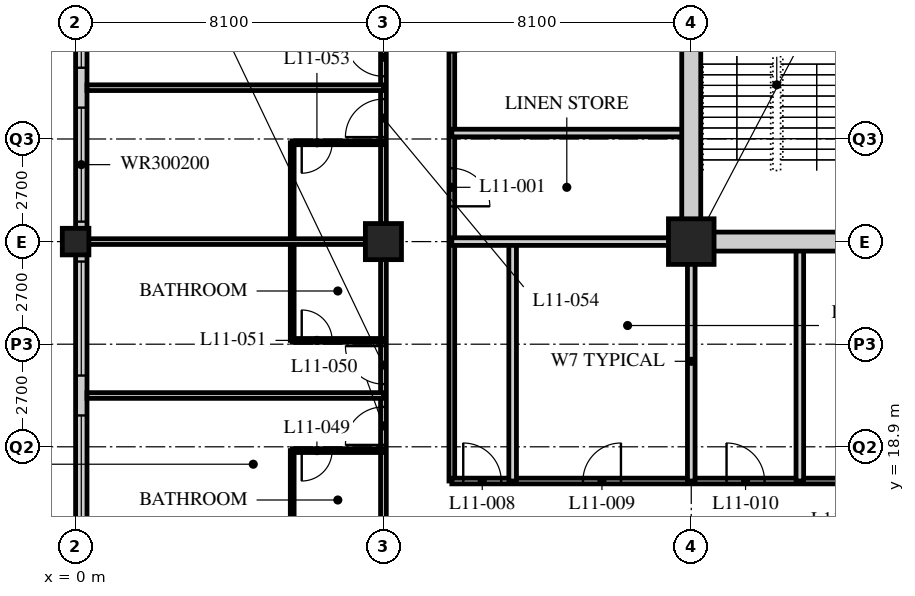
"""IFC4 building model, lengths in metres.
Left out: names, types, materials, properties, quantities, classifications, styles, units other than length and angle.
Written with IfcOpenShell. Run it as: python <this file> out.ifc"""

import sys

from ifc_helpers import new_model, si_unit, direction, frame, frame_2d, origin, origin_2d, place, context, subcontext, project, spatial, rectangle, hollow_rectangle, extrude, element, fill, save


model = new_model("IFC4")
c1 = context("Model", 3, precision=1e-05, world=origin(), true_north=direction((0.0, 1.0)))
c2 = subcontext(c1, "Body", "Model", "MODEL_VIEW")
j1 = project(units=[si_unit("LENGTHUNIT", "METRE"), si_unit("PLANEANGLEUNIT", "RADIAN")], contexts=[c1])
p1 = place(None, origin())
s1 = spatial("IfcSite", under=j1, at=p1, CompositionType="ELEMENT")
p2 = place(p1, origin())
s2 = spatial("IfcBuilding", under=s1, at=p2, CompositionType="ELEMENT")
p3 = place(p2, frame((0.0, 0.0, 50.0)))
s3 = spatial("IfcBuildingStorey", under=s2, at=p3, CompositionType="ELEMENT", Elevation=50.0)
p4 = place(p3, frame((0.0, 24.3, 0.0), z_axis=(0.0, 0.0, 1.0), x_axis=(1.0, 0.0, 0.0)))
e1 = element("IfcColumn", 1, at=p4, inside=s3, PredefinedType="COLUMN", context=c2, shape_type="SweptSolid", body=[
    extrude(hollow_rectangle(XDim=0.7, YDim=0.7, WallThickness=0.06, at=origin_2d()), origin(), (0.0, 0.0, 1.0), 3.4),
])
p5 = place(p3, frame((8.1, 24.3, 0.0), z_axis=(0.0, 0.0, 1.0), x_axis=(1.0, 0.0, 0.0)))
e2 = element("IfcColumn", 2, at=p5, inside=s3, PredefinedType="COLUMN", context=c2, shape_type="SweptSolid", body=[
    extrude(hollow_rectangle(XDim=0.95, YDim=0.95, WallThickness=0.095, at=origin_2d()), origin(), (0.0, 0.0, 1.0), 3.4),
])
p6 = place(p3, frame((16.2, 24.3, 0.0), z_axis=(0.0, 0.0, 1.0), x_axis=(1.0, 0.0, 0.0)))
e3 = element("IfcColumn", 3, at=p6, inside=s3, PredefinedType="COLUMN", context=c2, shape_type="SweptSolid", body=[
    extrude(hollow_rectangle(XDim=1.2, YDim=1.2, WallThickness=0.12, at=origin_2d()), origin(), (0.0, 0.0, 1.0), 3.4),
])
p7 = place(p3, frame((0.15, 40.2, 0.0), z_axis=(0.0, 0.0, 1.0), x_axis=(0.0, -1.0, 0.0)))
e4 = element("IfcWall", 4, at=p7, inside=s3, PredefinedType="SOLIDWALL", context=c2, shape_type="SweptSolid", body=[
    extrude(rectangle(XDim=32.1, YDim=0.3, at=frame_2d((16.05, 0.0))), origin(), (0.0, 0.0, 1.0), 3.19),
])
p8 = place(p7, frame((0.225, 0.0, 0.9)))
e5 = element("IfcOpeningElement", 5, at=p8, cuts=e4, PredefinedType="OPENING", context=c2, shape_type="SweptSolid", body=[
    extrude(rectangle(XDim=3.0, YDim=2.0, at=frame_2d((1.5, 1.0))), frame((0.0, 0.16, 0.0), z_axis=(0.0, -1.0, 0.0), x_axis=(1.0, 0.0, 0.0)), (0.0, 0.0, 1.0), 0.32),
])
p9 = place(p7, frame((4.275, 0.0, 0.9)))
e6 = element("IfcOpeningElement", 6, at=p9, cuts=e4, PredefinedType="OPENING", context=c2, shape_type="SweptSolid", body=[
    extrude(rectangle(XDim=3.0, YDim=2.0, at=frame_2d((1.5, 1.0))), frame((0.0, 0.16, 0.0), z_axis=(0.0, -1.0, 0.0), x_axis=(1.0, 0.0, 0.0)), (0.0, 0.0, 1.0), 0.32),
])
p10 = place(p7, frame((8.325, 0.0, 0.9)))
e7 = element("IfcOpeningElement", 7, at=p10, cuts=e4, PredefinedType="OPENING", context=c2, shape_type="SweptSolid", body=[
    extrude(rectangle(XDim=3.0, YDim=2.0, at=frame_2d((1.5, 1.0))), frame((0.0, 0.16, 0.0), z_axis=(0.0, -1.0, 0.0), x_axis=(1.0, 0.0, 0.0)), (0.0, 0.0, 1.0), 0.32),
])
p11 = place(p7, frame((12.375, 0.0, 0.9)))
e8 = element("IfcOpeningElement", 8, at=p11, cuts=e4, PredefinedType="OPENING", context=c2, shape_type="SweptSolid", body=[
    extrude(rectangle(XDim=3.0, YDim=2.0, at=frame_2d((1.5, 1.0))), frame((0.0, 0.16, 0.0), z_axis=(0.0, -1.0, 0.0), x_axis=(1.0, 0.0, 0.0)), (0.0, 0.0, 1.0), 0.32),
])
p12 = place(p7, frame((16.425, 0.0, 0.9)))
e9 = element("IfcOpeningElement", 9, at=p12, cuts=e4, PredefinedType="OPENING", context=c2, shape_type="SweptSolid", body=[
    extrude(rectangle(XDim=3.0, YDim=2.0, at=frame_2d((1.5, 1.0))), frame((0.0, 0.16, 0.0), z_axis=(0.0, -1.0, 0.0), x_axis=(1.0, 0.0, 0.0)), (0.0, 0.0, 1.0), 0.32),
])
p13 = place(p7, frame((20.475, 0.0, 0.9)))
e10 = element("IfcOpeningElement", 10, at=p13, cuts=e4, PredefinedType="OPENING", context=c2, shape_type="SweptSolid", body=[
    extrude(rectangle(XDim=3.0, YDim=2.0, at=frame_2d((1.5, 1.0))), frame((0.0, 0.16, 0.0), z_axis=(0.0, -1.0, 0.0), x_axis=(1.0, 0.0, 0.0)), (0.0, 0.0, 1.0), 0.32),
])
p14 = place(p7, frame((24.525, 0.0, 0.9)))
e11 = element("IfcOpeningElement", 11, at=p14, cuts=e4, PredefinedType="OPENING", context=c2, shape_type="SweptSolid", body=[
    extrude(rectangle(XDim=3.0, YDim=2.0, at=frame_2d((1.5, 1.0))), frame((0.0, 0.16, 0.0), z_axis=(0.0, -1.0, 0.0), x_axis=(1.0, 0.0, 0.0)), (0.0, 0.0, 1.0), 0.32),
])
p15 = place(p7, frame((28.575, 0.0, 0.9)))
e12 = element("IfcOpeningElement", 12, at=p15, cuts=e4, PredefinedType="OPENING", context=c2, shape_type="SweptSolid", body=[
    extrude(rectangle(XDim=3.0, YDim=2.0, at=frame_2d((1.5, 1.0))), frame((0.0, 0.16, 0.0), z_axis=(0.0, -1.0, 0.0), x_axis=(1.0, 0.0, 0.0)), (0.0, 0.0, 1.0), 0.32),
])
p16 = place(p3, frame((8.1, 16.2, 0.0), z_axis=(0.0, 0.0, 1.0), x_axis=(0.0, 1.0, 0.0)))
e13 = element("IfcWall", 13, at=p16, inside=s3, PredefinedType="PARTITIONING", context=c2, shape_type="SweptSolid", body=[
    extrude(rectangle(XDim=26.1, YDim=0.15, at=frame_2d((13.05, 0.0))), origin(), (0.0, 0.0, 1.0), 2.578),
])
p17 = place(p16, frame((2.75, 0.0, 0.0)))
e14 = element("IfcOpeningElement", 14, at=p17, cuts=e13, PredefinedType="OPENING", context=c2, shape_type="SweptSolid", body=[
    extrude(rectangle(XDim=1.0, YDim=2.1, at=frame_2d((0.5, 1.05))), frame((0.0, 0.085, 0.0), z_axis=(0.0, -1.0, 0.0), x_axis=(1.0, 0.0, 0.0)), (0.0, 0.0, 1.0), 0.17),
])
p18 = place(p16, frame((4.35, 0.0, 0.0)))
e15 = element("IfcOpeningElement", 15, at=p18, cuts=e13, PredefinedType="OPENING", context=c2, shape_type="SweptSolid", body=[
    extrude(rectangle(XDim=1.0, YDim=2.1, at=frame_2d((0.5, 1.05))), frame((0.0, 0.085, 0.0), z_axis=(0.0, -1.0, 0.0), x_axis=(1.0, 0.0, 0.0)), (0.0, 0.0, 1.0), 0.17),
])
p19 = place(p16, frame((10.85, 0.0, 0.0)))
e16 = element("IfcOpeningElement", 16, at=p19, cuts=e13, PredefinedType="OPENING", context=c2, shape_type="SweptSolid", body=[
    extrude(rectangle(XDim=1.0, YDim=2.1, at=frame_2d((0.5, 1.05))), frame((0.0, 0.085, 0.0), z_axis=(0.0, -1.0, 0.0), x_axis=(1.0, 0.0, 0.0)), (0.0, 0.0, 1.0), 0.17),
])
p20 = place(p16, frame((12.45, 0.0, 0.0)))
e17 = element("IfcOpeningElement", 17, at=p20, cuts=e13, PredefinedType="OPENING", context=c2, shape_type="SweptSolid", body=[
    extrude(rectangle(XDim=1.0, YDim=2.1, at=frame_2d((0.5, 1.05))), frame((0.0, 0.085, 0.0), z_axis=(0.0, -1.0, 0.0), x_axis=(1.0, 0.0, 0.0)), (0.0, 0.0, 1.0), 0.17),
])
p21 = place(p16, frame((18.65, 0.0, 0.0)))
e18 = element("IfcOpeningElement", 18, at=p21, cuts=e13, PredefinedType="OPENING", context=c2, shape_type="SweptSolid", body=[
    extrude(rectangle(XDim=1.0, YDim=2.1, at=frame_2d((0.5, 1.05))), frame((0.0, 0.085, 0.0), z_axis=(0.0, -1.0, 0.0), x_axis=(1.0, 0.0, 0.0)), (0.0, 0.0, 1.0), 0.17),
])
p22 = place(p16, frame((22.7, 0.0, 0.0)))
e19 = element("IfcOpeningElement", 19, at=p22, cuts=e13, PredefinedType="OPENING", context=c2, shape_type="SweptSolid", body=[
    extrude(rectangle(XDim=1.0, YDim=2.1, at=frame_2d((0.5, 1.05))), frame((0.0, 0.085, 0.0), z_axis=(0.0, -1.0, 0.0), x_axis=(1.0, 0.0, 0.0)), (0.0, 0.0, 1.0), 0.17),
])
p23 = place(p3, frame((9.9, 40.5, 0.0), z_axis=(0.0, 0.0, 1.0), x_axis=(0.0, -1.0, 0.0)))
e20 = element("IfcWall", 20, at=p23, inside=s3, PredefinedType="PARTITIONING", context=c2, shape_type="SweptSolid", body=[
    extrude(rectangle(XDim=22.5, YDim=0.15, at=frame_2d((11.25, 0.0))), origin(), (0.0, 0.0, 1.0), 3.19),
])
p24 = place(p23, frame((14.271, 0.0, 0.0)))
e21 = element("IfcOpeningElement", 21, at=p24, cuts=e20, PredefinedType="OPENING", context=c2, shape_type="SweptSolid", body=[
    extrude(rectangle(XDim=1.0, YDim=2.1, at=frame_2d((0.5, 1.05))), frame((0.0, 0.085, 0.0), z_axis=(0.0, -1.0, 0.0), x_axis=(1.0, 0.0, 0.0)), (0.0, 0.0, 1.0), 0.17),
])
p25 = place(p23, frame((10.221, 0.0, 0.0)))
e22 = element("IfcOpeningElement", 22, at=p25, cuts=e20, PredefinedType="OPENING", context=c2, shape_type="SweptSolid", body=[
    extrude(rectangle(XDim=1.0, YDim=2.1, at=frame_2d((0.5, 1.05))), frame((0.0, 0.085, 0.0), z_axis=(0.0, -1.0, 0.0), x_axis=(1.0, 0.0, 0.0)), (0.0, 0.0, 1.0), 0.17),
])
p26 = place(p23, frame((6.8, 0.0, 0.0)))
e23 = element("IfcOpeningElement", 23, at=p26, cuts=e20, PredefinedType="OPENING", context=c2, shape_type="SweptSolid", body=[
    extrude(rectangle(XDim=1.0, YDim=2.1, at=frame_2d((0.5, 1.05))), frame((0.0, 0.085, 0.0), z_axis=(0.0, -1.0, 0.0), x_axis=(1.0, 0.0, 0.0)), (0.0, 0.0, 1.0), 0.17),
])
p27 = place(p23, frame((2.75, 0.0, 0.0)))
e24 = element("IfcOpeningElement", 24, at=p27, cuts=e20, PredefinedType="OPENING", context=c2, shape_type="SweptSolid", body=[
    extrude(rectangle(XDim=1.0, YDim=2.1, at=frame_2d((0.5, 1.05))), frame((0.0, 0.085, 0.0), z_axis=(0.0, -1.0, 0.0), x_axis=(1.0, 0.0, 0.0)), (0.0, 0.0, 1.0), 0.17),
])
p28 = place(p3, frame((9.9, 18.0, 0.0), z_axis=(0.0, 0.0, 1.0), x_axis=(1.0, 0.0, 0.0)))
e25 = element("IfcWall", 25, at=p28, inside=s3, PredefinedType="PARTITIONING", context=c2, shape_type="SweptSolid", body=[
    extrude(rectangle(XDim=17.24, YDim=0.15, at=frame_2d((8.62, 0.0))), origin(), (0.0, 0.0, 1.0), 3.19),
])
p29 = place(p28, frame((0.3, 0.0, 0.0)))
e26 = element("IfcOpeningElement", 26, at=p29, cuts=e25, PredefinedType="OPENING", context=c2, shape_type="SweptSolid", body=[
    extrude(rectangle(XDim=1.0, YDim=2.1, at=frame_2d((0.5, 1.05))), frame((0.0, 0.085, 0.0), z_axis=(0.0, -1.0, 0.0), x_axis=(1.0, 0.0, 0.0)), (0.0, 0.0, 1.0), 0.17),
])
p30 = place(p28, frame((3.45, 0.0, 0.0)))
e27 = element("IfcOpeningElement", 27, at=p30, cuts=e25, PredefinedType="OPENING", context=c2, shape_type="SweptSolid", body=[
    extrude(rectangle(XDim=1.0, YDim=2.1, at=frame_2d((0.5, 1.05))), frame((0.0, 0.085, 0.0), z_axis=(0.0, -1.0, 0.0), x_axis=(1.0, 0.0, 0.0)), (0.0, 0.0, 1.0), 0.17),
])
p31 = place(p28, frame((7.229, 0.0, 0.0)))
e28 = element("IfcOpeningElement", 28, at=p31, cuts=e25, PredefinedType="OPENING", context=c2, shape_type="SweptSolid", body=[
    extrude(rectangle(XDim=1.0, YDim=2.1, at=frame_2d((0.5, 1.05))), frame((0.0, 0.085, 0.0), z_axis=(0.0, -1.0, 0.0), x_axis=(1.0, 0.0, 0.0)), (0.0, 0.0, 1.0), 0.17),
])
p32 = place(p28, frame((12.704, 0.0, 0.0)))
e29 = element("IfcOpeningElement", 29, at=p32, cuts=e25, PredefinedType="OPENING", context=c2, shape_type="SweptSolid", body=[
    extrude(rectangle(XDim=1.0, YDim=2.1, at=frame_2d((0.5, 1.05))), frame((0.0, 0.085, 0.0), z_axis=(0.0, -1.0, 0.0), x_axis=(1.0, 0.0, 0.0)), (0.0, 0.0, 1.0), 0.17),
])
p33 = place(p3, frame((9.9, 27.157, 0.0), z_axis=(0.0, 0.0, 1.0), x_axis=(1.0, 0.0, 0.0)))
e30 = element("IfcWall", 30, at=p33, inside=s3, PredefinedType="SOLIDWALL", context=c2, shape_type="SweptSolid", body=[
    extrude(rectangle(XDim=6.3, YDim=0.2, at=frame_2d((3.15, 0.0))), origin(), (0.0, 0.0, 1.0), 3.19),
])
p34 = place(p3, frame((16.2, 18.0, 0.0), z_axis=(0.0, 0.0, 1.0), x_axis=(0.0, 1.0, 0.0)))
e31 = element("IfcWall", 31, at=p34, inside=s3, PredefinedType="SOLIDWALL", context=c2, shape_type="SweptSolid", body=[
    extrude(rectangle(XDim=6.3, YDim=0.2, at=frame_2d((3.15, 0.0))), origin(), (0.0, 0.0, 1.0), 2.578),
])
for number, where, z_axis, x_axis in (
    (32, (11.5, 18.0, 0.0), (0.0, 0.0, 1.0), (0.0, 1.0, 0.0)),
    (33, (19.057, 18.0, 0.0), (0.0, 0.0, 1.0), (0.0, 1.0, 0.0)),
):
    element("IfcWall", number, at=place(p3, frame(where, z_axis=z_axis, x_axis=x_axis)), inside=s3, PredefinedType="SOLIDWALL", context=c2, shape_type="SweptSolid", body=[
        extrude(rectangle(XDim=6.3, YDim=0.2, at=frame_2d((3.15, 0.0))), origin(), (0.0, 0.0, 1.0), 3.19),
    ])
p35 = place(p3, frame((9.9, 24.3, 0.0), z_axis=(0.0, 0.0, 1.0), x_axis=(1.0, 0.0, 0.0)))
e34 = element("IfcWall", 34, at=p35, inside=s3, PredefinedType="SOLIDWALL", context=c2, shape_type="SweptSolid", body=[
    extrude(rectangle(XDim=6.3, YDim=0.2, at=frame_2d((3.15, 0.0))), origin(), (0.0, 0.0, 1.0), 2.578),
])
p36 = place(p3, frame((5.7, 16.2, 0.0), z_axis=(0.0, 0.0, 1.0), x_axis=(0.0, 1.0, 0.0)))
e35 = element("IfcWall", 35, at=p36, inside=s3, PredefinedType="PARTITIONING", context=c2, shape_type="SweptSolid", body=[
    extrude(rectangle(XDim=2.6, YDim=0.1, at=frame_2d((1.3, 0.0))), origin(), (0.0, 0.0, 1.0), 3.19),
])
p37 = place(p3, frame((8.1, 18.8, 0.0), z_axis=(0.0, 0.0, 1.0), x_axis=(-1.0, 0.0, 0.0)))
e36 = element("IfcWall", 36, at=p37, inside=s3, PredefinedType="PARTITIONING", context=c2, shape_type="SweptSolid", body=[
    extrude(rectangle(XDim=2.4, YDim=0.1, at=frame_2d((1.2, 0.0))), origin(), (0.0, 0.0, 1.0), 3.19),
])
p38 = place(p37, frame((1.35, 0.0, 0.0)))
e37 = element("IfcOpeningElement", 37, at=p38, cuts=e36, PredefinedType="OPENING", context=c2, shape_type="SweptSolid", body=[
    extrude(rectangle(XDim=0.8, YDim=2.1, at=frame_2d((0.4, 1.05))), frame((0.0, 0.06, 0.0), z_axis=(0.0, -1.0, 0.0), x_axis=(1.0, 0.0, 0.0)), (0.0, 0.0, 1.0), 0.12),
])
p39 = place(p3, frame((8.1, 20.25, 0.0), z_axis=(0.0, 0.0, 1.0), x_axis=(-1.0, 0.0, 0.0)))
e38 = element("IfcWall", 38, at=p39, inside=s3, PredefinedType="PARTITIONING", context=c2, shape_type="SweptSolid", body=[
    extrude(rectangle(XDim=7.8, YDim=0.15, at=frame_2d((3.9, 0.0))), origin(), (0.0, 0.0, 1.0), 3.19),
])
p40 = place(p3, frame((5.7, 21.7, 0.0), z_axis=(0.0, 0.0, 1.0), x_axis=(0.0, 1.0, 0.0)))
e39 = element("IfcWall", 39, at=p40, inside=s3, PredefinedType="PARTITIONING", context=c2, shape_type="SweptSolid", body=[
    extrude(rectangle(XDim=5.2, YDim=0.1, at=frame_2d((2.6, 0.0))), origin(), (0.0, 0.0, 1.0), 3.19),
])
p41 = place(p3, frame((8.1, 21.7, 0.0), z_axis=(0.0, 0.0, 1.0), x_axis=(-1.0, 0.0, 0.0)))
e40 = element("IfcWall", 40, at=p41, inside=s3, PredefinedType="PARTITIONING", context=c2, shape_type="SweptSolid", body=[
    extrude(rectangle(XDim=2.4, YDim=0.1, at=frame_2d((1.2, 0.0))), origin(), (0.0, 0.0, 1.0), 3.19),
])
p42 = place(p41, frame((1.35, 0.0, 0.0)))
e41 = element("IfcOpeningElement", 41, at=p42, cuts=e40, PredefinedType="OPENING", context=c2, shape_type="SweptSolid", body=[
    extrude(rectangle(XDim=0.8, YDim=2.1, at=frame_2d((0.4, 1.05))), frame((0.0, 0.06, 0.0), z_axis=(0.0, -1.0, 0.0), x_axis=(1.0, 0.0, 0.0)), (0.0, 0.0, 1.0), 0.12),
])
p43 = place(p3, frame((8.1, 24.3, 0.0), z_axis=(0.0, 0.0, 1.0), x_axis=(-1.0, 0.0, 0.0)))
e42 = element("IfcWall", 42, at=p43, inside=s3, PredefinedType="PARTITIONING", context=c2, shape_type="SweptSolid", body=[
    extrude(rectangle(XDim=7.8, YDim=0.15, at=frame_2d((3.9, 0.0))), origin(), (0.0, 0.0, 1.0), 2.578),
])
p44 = place(p3, frame((8.1, 26.9, 0.0), z_axis=(0.0, 0.0, 1.0), x_axis=(-1.0, 0.0, 0.0)))
e43 = element("IfcWall", 43, at=p44, inside=s3, PredefinedType="PARTITIONING", context=c2, shape_type="SweptSolid", body=[
    extrude(rectangle(XDim=2.4, YDim=0.1, at=frame_2d((1.2, 0.0))), origin(), (0.0, 0.0, 1.0), 3.19),
])
p45 = place(p44, frame((1.35, 0.0, 0.0)))
e44 = element("IfcOpeningElement", 44, at=p45, cuts=e43, PredefinedType="OPENING", context=c2, shape_type="SweptSolid", body=[
    extrude(rectangle(XDim=0.8, YDim=2.1, at=frame_2d((0.4, 1.05))), frame((0.0, 0.06, 0.0), z_axis=(0.0, -1.0, 0.0), x_axis=(1.0, 0.0, 0.0)), (0.0, 0.0, 1.0), 0.12),
])
p46 = place(p3, frame((8.1, 28.35, 0.0), z_axis=(0.0, 0.0, 1.0), x_axis=(-1.0, 0.0, 0.0)))
e45 = element("IfcWall", 45, at=p46, inside=s3, PredefinedType="PARTITIONING", context=c2, shape_type="SweptSolid", body=[
    extrude(rectangle(XDim=7.8, YDim=0.15, at=frame_2d((3.9, 0.0))), origin(), (0.0, 0.0, 1.0), 3.19),
])
p47 = place(p3, frame((15.95, 24.3, 0.0), z_axis=(0.0, 0.0, 1.0), x_axis=(1.0, 0.0, 0.0)))
e46 = element("IfcWall", 46, at=p47, inside=s3, PredefinedType="SOLIDWALL", context=c2, shape_type="SweptSolid", body=[
    extrude(rectangle(XDim=24.8, YDim=0.5, at=frame_2d((12.4, 0.0))), origin(), (0.0, 0.0, 1.0), 2.54),
])
p48 = place(p47, frame((11.5, 0.0, 0.0)))
e47 = element("IfcOpeningElement", 47, at=p48, cuts=e46, PredefinedType="OPENING", context=c2, shape_type="SweptSolid", body=[
    extrude(rectangle(XDim=1.8, YDim=2.4, at=frame_2d((0.9, 1.2))), frame((0.0, 0.26, 0.0), z_axis=(0.0, -1.0, 0.0), x_axis=(1.0, 0.0, 0.0)), (0.0, 0.0, 1.0), 0.52),
])
p49 = place(p3, frame((16.2, 24.55, 0.0), z_axis=(0.0, 0.0, 1.0), x_axis=(0.0, 1.0, 0.0)))
e48 = element("IfcWall", 48, at=p49, inside=s3, PredefinedType="SOLIDWALL", context=c2, shape_type="SweptSolid", body=[
    extrude(rectangle(XDim=15.7, YDim=0.5, at=frame_2d((7.85, 0.0))), origin(), (0.0, 0.0, 1.0), 2.578),
])
p50 = place(p10, origin())
e49 = element("IfcWindow", 49, at=p50, inside=s3, PartitioningType="SINGLE_PANEL", PredefinedType="WINDOW", context=c2, shape_type="SweptSolid", body=[
    extrude(rectangle(XDim=3.0, YDim=2.0, at=frame_2d((1.5, 1.0))), frame((0.0, 0.03, 0.0), z_axis=(0.0, -1.0, 0.0), x_axis=(1.0, 0.0, 0.0)), (0.0, 0.0, 1.0), 0.06),
])
fill(e7, e49)
p51 = place(p11, origin())
e50 = element("IfcWindow", 50, at=p51, inside=s3, PartitioningType="SINGLE_PANEL", PredefinedType="WINDOW", context=c2, shape_type="SweptSolid", body=[
    extrude(rectangle(XDim=3.0, YDim=2.0, at=frame_2d((1.5, 1.0))), frame((0.0, 0.03, 0.0), z_axis=(0.0, -1.0, 0.0), x_axis=(1.0, 0.0, 0.0)), (0.0, 0.0, 1.0), 0.06),
])
fill(e8, e50)
p52 = place(p12, origin())
e51 = element("IfcWindow", 51, at=p52, inside=s3, PartitioningType="SINGLE_PANEL", PredefinedType="WINDOW", context=c2, shape_type="SweptSolid", body=[
    extrude(rectangle(XDim=3.0, YDim=2.0, at=frame_2d((1.5, 1.0))), frame((0.0, 0.03, 0.0), z_axis=(0.0, -1.0, 0.0), x_axis=(1.0, 0.0, 0.0)), (0.0, 0.0, 1.0), 0.06),
])
fill(e9, e51)
p53 = place(p13, origin())
e52 = element("IfcWindow", 52, at=p53, inside=s3, PartitioningType="SINGLE_PANEL", PredefinedType="WINDOW", context=c2, shape_type="SweptSolid", body=[
    extrude(rectangle(XDim=3.0, YDim=2.0, at=frame_2d((1.5, 1.0))), frame((0.0, 0.03, 0.0), z_axis=(0.0, -1.0, 0.0), x_axis=(1.0, 0.0, 0.0)), (0.0, 0.0, 1.0), 0.06),
])
fill(e10, e52)
p54 = place(p24, origin())
e53 = element("IfcDoor", 53, at=p54, inside=s3, OperationType="SINGLE_SWING_RIGHT", PredefinedType="DOOR", context=c2, shape_type="SweptSolid", body=[
    extrude(rectangle(XDim=1.0, YDim=2.1, at=frame_2d((0.5, 1.05))), frame((0.0, 0.025, 0.0), z_axis=(0.0, -1.0, 0.0), x_axis=(1.0, 0.0, 0.0)), (0.0, 0.0, 1.0), 0.05),
])
fill(e21, e53)
p55 = place(p29, origin())
e54 = element("IfcDoor", 54, at=p55, inside=s3, OperationType="SINGLE_SWING_LEFT", PredefinedType="DOOR", context=c2, shape_type="SweptSolid", body=[
    extrude(rectangle(XDim=1.0, YDim=2.1, at=frame_2d((0.5, 1.05))), frame((0.0, 0.025, 0.0), z_axis=(0.0, -1.0, 0.0), x_axis=(1.0, 0.0, 0.0)), (0.0, 0.0, 1.0), 0.05),
])
fill(e26, e54)
p56 = place(p30, origin())
e55 = element("IfcDoor", 55, at=p56, inside=s3, OperationType="SINGLE_SWING_RIGHT", PredefinedType="DOOR", context=c2, shape_type="SweptSolid", body=[
    extrude(rectangle(XDim=1.0, YDim=2.1, at=frame_2d((0.5, 1.05))), frame((0.0, 0.025, 0.0), z_axis=(0.0, -1.0, 0.0), x_axis=(1.0, 0.0, 0.0)), (0.0, 0.0, 1.0), 0.05),
])
fill(e27, e55)
p57 = place(p31, origin())
e56 = element("IfcDoor", 56, at=p57, inside=s3, OperationType="SINGLE_SWING_LEFT", PredefinedType="DOOR", context=c2, shape_type="SweptSolid", body=[
    extrude(rectangle(XDim=1.0, YDim=2.1, at=frame_2d((0.5, 1.05))), frame((0.0, 0.025, 0.0), z_axis=(0.0, -1.0, 0.0), x_axis=(1.0, 0.0, 0.0)), (0.0, 0.0, 1.0), 0.05),
])
fill(e28, e56)
p58 = place(p38, origin())
e57 = element("IfcDoor", 57, at=p58, inside=s3, OperationType="SINGLE_SWING_RIGHT", PredefinedType="DOOR", context=c2, shape_type="SweptSolid", body=[
    extrude(rectangle(XDim=0.8, YDim=2.1, at=frame_2d((0.4, 1.05))), frame((0.0, 0.025, 0.0), z_axis=(0.0, -1.0, 0.0), x_axis=(1.0, 0.0, 0.0)), (0.0, 0.0, 1.0), 0.05),
])
fill(e37, e57)
p59 = place(p17, origin())
e58 = element("IfcDoor", 58, at=p59, inside=s3, OperationType="SINGLE_SWING_LEFT", PredefinedType="DOOR", context=c2, shape_type="SweptSolid", body=[
    extrude(rectangle(XDim=1.0, YDim=2.1, at=frame_2d((0.5, 1.05))), frame((0.0, 0.025, 0.0), z_axis=(0.0, -1.0, 0.0), x_axis=(1.0, 0.0, 0.0)), (0.0, 0.0, 1.0), 0.05),
])
fill(e14, e58)
p60 = place(p42, origin())
e59 = element("IfcDoor", 59, at=p60, inside=s3, OperationType="SINGLE_SWING_LEFT", PredefinedType="DOOR", context=c2, shape_type="SweptSolid", body=[
    extrude(rectangle(XDim=0.8, YDim=2.1, at=frame_2d((0.4, 1.05))), frame((0.0, 0.025, 0.0), z_axis=(0.0, -1.0, 0.0), x_axis=(1.0, 0.0, 0.0)), (0.0, 0.0, 1.0), 0.05),
])
fill(e41, e59)
p61 = place(p18, origin())
e60 = element("IfcDoor", 60, at=p61, inside=s3, OperationType="SINGLE_SWING_RIGHT", PredefinedType="DOOR", context=c2, shape_type="SweptSolid", body=[
    extrude(rectangle(XDim=1.0, YDim=2.1, at=frame_2d((0.5, 1.05))), frame((0.0, 0.025, 0.0), z_axis=(0.0, -1.0, 0.0), x_axis=(1.0, 0.0, 0.0)), (0.0, 0.0, 1.0), 0.05),
])
fill(e15, e60)
p62 = place(p45, origin())
e61 = element("IfcDoor", 61, at=p62, inside=s3, OperationType="SINGLE_SWING_RIGHT", PredefinedType="DOOR", context=c2, shape_type="SweptSolid", body=[
    extrude(rectangle(XDim=0.8, YDim=2.1, at=frame_2d((0.4, 1.05))), frame((0.0, 0.025, 0.0), z_axis=(0.0, -1.0, 0.0), x_axis=(1.0, 0.0, 0.0)), (0.0, 0.0, 1.0), 0.05),
])
fill(e44, e61)
p63 = place(p19, origin())
e62 = element("IfcDoor", 62, at=p63, inside=s3, OperationType="SINGLE_SWING_LEFT", PredefinedType="DOOR", context=c2, shape_type="SweptSolid", body=[
    extrude(rectangle(XDim=1.0, YDim=2.1, at=frame_2d((0.5, 1.05))), frame((0.0, 0.025, 0.0), z_axis=(0.0, -1.0, 0.0), x_axis=(1.0, 0.0, 0.0)), (0.0, 0.0, 1.0), 0.05),
])
fill(e16, e62)
p64 = place(p20, origin())
e63 = element("IfcDoor", 63, at=p64, inside=s3, OperationType="SINGLE_SWING_RIGHT", PredefinedType="DOOR", context=c2, shape_type="SweptSolid", body=[
    extrude(rectangle(XDim=1.0, YDim=2.1, at=frame_2d((0.5, 1.05))), frame((0.0, 0.025, 0.0), z_axis=(0.0, -1.0, 0.0), x_axis=(1.0, 0.0, 0.0)), (0.0, 0.0, 1.0), 0.05),
])
fill(e17, e63)
save(model, sys.argv[1])
